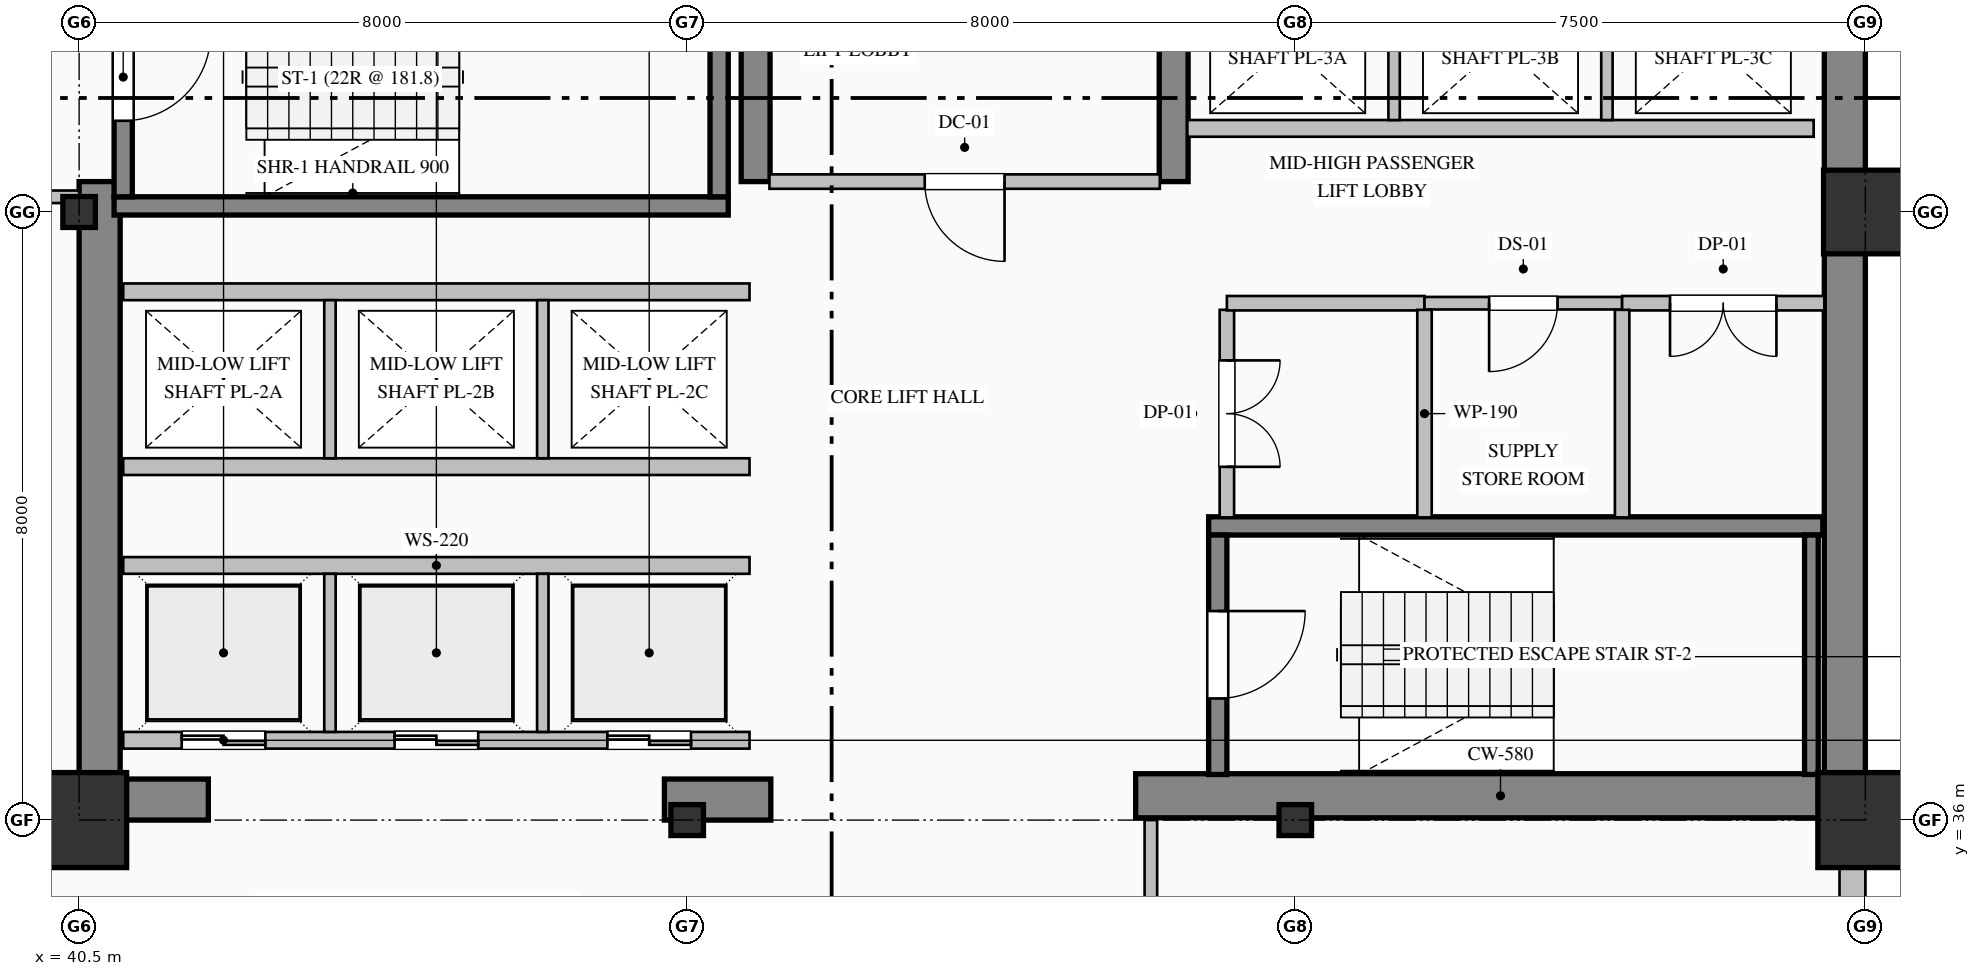
"""IFC4 building model, lengths in metres.
Left out: names, types, materials, properties, quantities, classifications, styles, units other than length and angle.
Written with IfcOpenShell. Run it as: python <this file> out.ifc"""

import sys

from ifc_helpers import new_model, si_unit, direction, frame, frame_2d, origin, origin_2d, place, context, subcontext, project, spatial, rectangle, hollow_rectangle, i_section, extrude, element, fill, save


model = new_model("IFC4")
c1 = context("Model", 3, precision=1e-05, world=origin(), true_north=direction((0.0, 1.0)))
c2 = subcontext(c1, "Body", "Model", "MODEL_VIEW")
j1 = project(units=[si_unit("LENGTHUNIT", "METRE"), si_unit("PLANEANGLEUNIT", "RADIAN")], contexts=[c1])
p1 = place(None, origin())
s1 = spatial("IfcSite", under=j1, at=p1, CompositionType="ELEMENT")
p2 = place(p1, origin())
s2 = spatial("IfcBuilding", under=s1, at=p2, CompositionType="ELEMENT")
p3 = place(p2, frame((0.0, 0.0, 60.2)))
s3 = spatial("IfcBuildingStorey", under=s2, at=p3, CompositionType="ELEMENT", Elevation=60.2)
p4 = place(p3, frame((63.73, 36.32, 0.0), z_axis=(0.0, 0.0, 1.0), x_axis=(0.0, 1.0, 0.0)))
e1 = element("IfcWall", 1, at=p4, inside=s3, PredefinedType="SHEAR", context=c2, shape_type="SweptSolid", body=[
    extrude(rectangle(XDim=15.14, YDim=0.54, at=frame_2d((7.57, 0.0))), origin(), (0.0, 0.0, 1.0), 3.75),
])
p5 = place(p3, frame((40.77, 36.54, 0.0), z_axis=(0.0, 0.0, 1.0), x_axis=(0.0, 1.0, 0.0)))
e2 = element("IfcWall", 2, at=p5, inside=s3, PredefinedType="SHEAR", context=c2, shape_type="SweptSolid", body=[
    extrude(rectangle(XDim=7.86, YDim=0.54, at=frame_2d((3.93, 0.0))), origin(), (0.0, 0.0, 1.0), 3.75),
])
p6 = place(p3, frame((40.5, 36.27, 0.0), z_axis=(0.0, 0.0, 1.0), x_axis=(1.0, 0.0, 0.0)))
e3 = element("IfcWall", 3, at=p6, inside=s3, PredefinedType="SHEAR", context=c2, shape_type="SweptSolid", body=[
    extrude(rectangle(XDim=1.7, YDim=0.54, at=frame_2d((0.85, 0.0))), origin(), (0.0, 0.0, 1.0), 3.75),
])
p7 = place(p3, frame((48.2, 36.27, 0.0), z_axis=(0.0, 0.0, 1.0), x_axis=(1.0, 0.0, 0.0)))
e4 = element("IfcWall", 4, at=p7, inside=s3, PredefinedType="SHEAR", context=c2, shape_type="SweptSolid", body=[
    extrude(rectangle(XDim=1.4, YDim=0.54, at=frame_2d((0.7, 0.0))), origin(), (0.0, 0.0, 1.0), 3.75),
])
p8 = place(p3, frame((54.4, 36.32, 0.0), z_axis=(0.0, 0.0, 1.0), x_axis=(1.0, 0.0, 0.0)))
e5 = element("IfcWall", 5, at=p8, inside=s3, PredefinedType="SHEAR", context=c2, shape_type="SweptSolid", body=[
    extrude(rectangle(XDim=9.6, YDim=0.58, at=frame_2d((4.8, 0.0))), origin(), (0.0, 0.0, 1.0), 4.0),
])
p9 = place(p3, frame((49.4, 44.4, 0.0), z_axis=(0.0, 0.0, 1.0), x_axis=(0.0, 1.0, 0.0)))
e6 = element("IfcWall", 6, at=p9, inside=s3, PredefinedType="SHEAR", context=c2, shape_type="SweptSolid", body=[
    extrude(rectangle(XDim=3.0, YDim=0.38, at=frame_2d((1.5, 0.0))), origin(), (0.0, 0.0, 1.0), 3.75),
])
p10 = place(p3, frame((54.9, 44.4, 0.0), z_axis=(0.0, 0.0, 1.0), x_axis=(0.0, 1.0, 0.0)))
e7 = element("IfcWall", 7, at=p10, inside=s3, PredefinedType="SHEAR", context=c2, shape_type="SweptSolid", body=[
    extrude(rectangle(XDim=7.06, YDim=0.38, at=frame_2d((3.53, 0.0))), origin(), (0.0, 0.0, 1.0), 3.75),
])
p11 = place(p3, frame((40.5, 36.0, 0.0), z_axis=(0.0, 0.0, 1.0), x_axis=(1.0, 0.0, 0.0)))
e8 = element("IfcColumn", 8, at=p11, inside=s3, PredefinedType="COLUMN", context=c2, shape_type="SweptSolid", body=[
    extrude(hollow_rectangle(XDim=1.25, YDim=1.25, WallThickness=0.045, at=origin_2d()), origin(), (0.0, 0.0, 1.0), 4.0),
])
for number, where, z_axis, x_axis in (
    (9, (40.5, 44.0, 0.0), (0.0, 0.0, 1.0), (1.0, 0.0, 0.0)),
    (10, (48.5, 36.0, 0.0), (0.0, 0.0, 1.0), (1.0, 0.0, 0.0)),
    (11, (56.5, 36.0, 0.0), (0.0, 0.0, 1.0), (1.0, 0.0, 0.0)),
):
    element("IfcColumn", number, at=place(p3, frame(where, z_axis=z_axis, x_axis=x_axis)), inside=s3, PredefinedType="COLUMN", context=c2, shape_type="SweptSolid", body=[
        extrude(i_section(OverallWidth=0.407, OverallDepth=0.428, WebThickness=0.02, FlangeThickness=0.035, FilletRadius=0.022, at=origin_2d()), origin(), (0.0, 0.0, 1.0), 4.0),
    ])
p12 = place(p3, frame((64.0, 36.0, 0.0), z_axis=(0.0, 0.0, 1.0), x_axis=(1.0, 0.0, 0.0)))
e12 = element("IfcColumn", 12, at=p12, inside=s3, PredefinedType="COLUMN", context=c2, shape_type="SweptSolid", body=[
    extrude(hollow_rectangle(XDim=1.25, YDim=1.25, WallThickness=0.045, at=origin_2d()), origin(), (0.0, 0.0, 1.0), 4.0),
])
p13 = place(p3, frame((64.0, 44.0, 0.0), z_axis=(0.0, 0.0, 1.0), x_axis=(1.0, 0.0, 0.0)))
e13 = element("IfcColumn", 13, at=p13, inside=s3, PredefinedType="COLUMN", context=c2, shape_type="SweptSolid", body=[
    extrude(hollow_rectangle(XDim=1.1, YDim=1.1, WallThickness=0.04, at=origin_2d()), origin(), (0.0, 0.0, 1.0), 4.0),
])
p14 = place(p3, frame((63.83, 36.05, 0.0), z_axis=(0.0, 0.0, 1.0), x_axis=(0.0, -1.0, 0.0)))
e14 = element("IfcWall", 14, at=p14, inside=s3, PredefinedType="SOLIDWALL", context=c2, shape_type="SweptSolid", body=[
    extrude(rectangle(XDim=28.05, YDim=0.34, at=frame_2d((14.025, 0.0))), origin(), (0.0, 0.0, 1.0), 3.25),
])
p15 = place(p14, frame((2.4, 0.0, 0.8)))
e15 = element("IfcOpeningElement", 15, at=p15, cuts=e14, PredefinedType="OPENING", context=c2, shape_type="SweptSolid", body=[
    extrude(rectangle(XDim=2.4, YDim=2.15, at=frame_2d((1.2, 1.075))), frame((0.0, 0.18, 0.0), z_axis=(0.0, -1.0, 0.0), x_axis=(1.0, 0.0, 0.0)), (0.0, 0.0, 1.0), 0.36),
])
p16 = place(p14, frame((9.75, 0.0, 0.85)))
e16 = element("IfcOpeningElement", 16, at=p16, cuts=e14, PredefinedType="OPENING", context=c2, shape_type="SweptSolid", body=[
    extrude(rectangle(XDim=2.1, YDim=2.05, at=frame_2d((1.05, 1.025))), frame((0.0, 0.18, 0.0), z_axis=(0.0, -1.0, 0.0), x_axis=(1.0, 0.0, 0.0)), (0.0, 0.0, 1.0), 0.36),
])
p17 = place(p3, frame((49.04, 44.08, 0.0), z_axis=(0.0, 0.0, 1.0), x_axis=(-1.0, 0.0, 0.0)))
e17 = element("IfcWall", 17, at=p17, inside=s3, PredefinedType="SOLIDWALL", context=c2, shape_type="SweptSolid", body=[
    extrude(rectangle(XDim=8.08, YDim=0.24, at=frame_2d((4.04, 0.0))), origin(), (0.0, 0.0, 1.0), 4.0),
])
p18 = place(p3, frame((41.08, 47.35, 0.0), z_axis=(0.0, 0.0, 1.0), x_axis=(0.0, -1.0, 0.0)))
e18 = element("IfcWall", 18, at=p18, inside=s3, PredefinedType="SOLIDWALL", context=c2, shape_type="SweptSolid", body=[
    extrude(rectangle(XDim=3.15, YDim=0.24, at=frame_2d((1.575, 0.0))), origin(), (0.0, 0.0, 1.0), 4.0),
])
p19 = place(p18, frame((1.0, 0.0, 0.0)))
e19 = element("IfcOpeningElement", 19, at=p19, cuts=e18, PredefinedType="OPENING", context=c2, shape_type="SweptSolid", body=[
    extrude(rectangle(XDim=1.15, YDim=2.2, at=frame_2d((0.575, 1.1))), frame((0.0, 0.13, 0.0), z_axis=(0.0, -1.0, 0.0), x_axis=(1.0, 0.0, 0.0)), (0.0, 0.0, 1.0), 0.26),
])
p20 = place(p3, frame((48.92, 44.2, 0.0), z_axis=(0.0, 0.0, 1.0), x_axis=(0.0, 1.0, 0.0)))
e20 = element("IfcWall", 20, at=p20, inside=s3, PredefinedType="SOLIDWALL", context=c2, shape_type="SweptSolid", body=[
    extrude(rectangle(XDim=3.15, YDim=0.24, at=frame_2d((1.575, 0.0))), origin(), (0.0, 0.0, 1.0), 4.0),
])
p21 = place(p3, frame((55.36, 39.87, 0.0), z_axis=(0.0, 0.0, 1.0), x_axis=(1.0, 0.0, 0.0)))
e21 = element("IfcWall", 21, at=p21, inside=s3, PredefinedType="SOLIDWALL", context=c2, shape_type="SweptSolid", body=[
    extrude(rectangle(XDim=8.08, YDim=0.24, at=frame_2d((4.04, 0.0))), origin(), (0.0, 0.0, 1.0), 4.0),
])
p22 = place(p3, frame((55.48, 39.75, 0.0), z_axis=(0.0, 0.0, 1.0), x_axis=(0.0, -1.0, 0.0)))
e22 = element("IfcWall", 22, at=p22, inside=s3, PredefinedType="SOLIDWALL", context=c2, shape_type="SweptSolid", body=[
    extrude(rectangle(XDim=3.15, YDim=0.24, at=frame_2d((1.575, 0.0))), origin(), (0.0, 0.0, 1.0), 4.0),
])
p23 = place(p22, frame((1.0, 0.0, 0.0)))
e23 = element("IfcOpeningElement", 23, at=p23, cuts=e22, PredefinedType="OPENING", context=c2, shape_type="SweptSolid", body=[
    extrude(rectangle(XDim=1.15, YDim=2.2, at=frame_2d((0.575, 1.1))), frame((0.0, 0.13, 0.0), z_axis=(0.0, -1.0, 0.0), x_axis=(1.0, 0.0, 0.0)), (0.0, 0.0, 1.0), 0.26),
])
p24 = place(p3, frame((63.29, 36.6, 0.0), z_axis=(0.0, 0.0, 1.0), x_axis=(0.0, 1.0, 0.0)))
e24 = element("IfcWall", 24, at=p24, inside=s3, PredefinedType="SOLIDWALL", context=c2, shape_type="SweptSolid", body=[
    extrude(rectangle(XDim=3.15, YDim=0.18, at=frame_2d((1.575, 0.0))), origin(), (0.0, 0.0, 1.0), 4.0),
])
p25 = place(p3, frame((49.32, 37.05, 0.0), z_axis=(0.0, 0.0, 1.0), x_axis=(-1.0, 0.0, 0.0)))
e25 = element("IfcWall", 25, at=p25, inside=s3, PredefinedType="PARTITIONING", context=c2, shape_type="SweptSolid", body=[
    extrude(rectangle(XDim=8.24, YDim=0.22, at=frame_2d((4.12, 0.0))), origin(), (0.0, 0.0, 1.0), 3.75),
])
p26 = place(p25, frame((6.37, 0.0, 0.0)))
e26 = element("IfcOpeningElement", 26, at=p26, cuts=e25, PredefinedType="OPENING", context=c2, shape_type="SweptSolid", body=[
    extrude(rectangle(XDim=1.1, YDim=2.2, at=frame_2d((0.55, 1.1))), frame((0.0, 0.12, 0.0), z_axis=(0.0, -1.0, 0.0), x_axis=(1.0, 0.0, 0.0)), (0.0, 0.0, 1.0), 0.24),
])
p27 = place(p25, frame((3.57, 0.0, 0.0)))
e27 = element("IfcOpeningElement", 27, at=p27, cuts=e25, PredefinedType="OPENING", context=c2, shape_type="SweptSolid", body=[
    extrude(rectangle(XDim=1.1, YDim=2.2, at=frame_2d((0.55, 1.1))), frame((0.0, 0.12, 0.0), z_axis=(0.0, -1.0, 0.0), x_axis=(1.0, 0.0, 0.0)), (0.0, 0.0, 1.0), 0.24),
])
p28 = place(p25, frame((0.77, 0.0, 0.0)))
e28 = element("IfcOpeningElement", 28, at=p28, cuts=e25, PredefinedType="OPENING", context=c2, shape_type="SweptSolid", body=[
    extrude(rectangle(XDim=1.1, YDim=2.2, at=frame_2d((0.55, 1.1))), frame((0.0, 0.12, 0.0), z_axis=(0.0, -1.0, 0.0), x_axis=(1.0, 0.0, 0.0)), (0.0, 0.0, 1.0), 0.24),
])
p29 = place(p3, frame((41.08, 39.35, 0.0), z_axis=(0.0, 0.0, 1.0), x_axis=(1.0, 0.0, 0.0)))
e29 = element("IfcWall", 29, at=p29, inside=s3, PredefinedType="PARTITIONING", context=c2, shape_type="SweptSolid", body=[
    extrude(rectangle(XDim=8.24, YDim=0.22, at=frame_2d((4.12, 0.0))), origin(), (0.0, 0.0, 1.0), 3.75),
])
for number, where, z_axis, x_axis in (
    (30, (43.8, 37.16, 0.0), (0.0, 0.0, 1.0), (0.0, 1.0, 0.0)),
    (31, (46.6, 37.16, 0.0), (0.0, 0.0, 1.0), (0.0, 1.0, 0.0)),
):
    element("IfcWall", number, at=place(p3, frame(where, z_axis=z_axis, x_axis=x_axis)), inside=s3, PredefinedType="PARTITIONING", context=c2, shape_type="SweptSolid", body=[
        extrude(rectangle(XDim=2.08, YDim=0.15, at=frame_2d((1.04, 0.0))), origin(), (0.0, 0.0, 1.0), 3.75),
    ])
for number, where, z_axis, x_axis in (
    (32, (49.32, 40.65, 0.0), (0.0, 0.0, 1.0), (-1.0, 0.0, 0.0)),
    (33, (41.08, 42.95, 0.0), (0.0, 0.0, 1.0), (1.0, 0.0, 0.0)),
):
    element("IfcWall", number, at=place(p3, frame(where, z_axis=z_axis, x_axis=x_axis)), inside=s3, PredefinedType="PARTITIONING", context=c2, shape_type="SweptSolid", body=[
        extrude(rectangle(XDim=8.24, YDim=0.22, at=frame_2d((4.12, 0.0))), origin(), (0.0, 0.0, 1.0), 3.75),
    ])
for number, where, z_axis, x_axis in (
    (34, (43.8, 40.76, 0.0), (0.0, 0.0, 1.0), (0.0, 1.0, 0.0)),
    (35, (46.6, 40.76, 0.0), (0.0, 0.0, 1.0), (0.0, 1.0, 0.0)),
):
    element("IfcWall", number, at=place(p3, frame(where, z_axis=z_axis, x_axis=x_axis)), inside=s3, PredefinedType="PARTITIONING", context=c2, shape_type="SweptSolid", body=[
        extrude(rectangle(XDim=2.08, YDim=0.15, at=frame_2d((1.04, 0.0))), origin(), (0.0, 0.0, 1.0), 3.75),
    ])
p30 = place(p3, frame((63.32, 45.1, 0.0), z_axis=(0.0, 0.0, 1.0), x_axis=(-1.0, 0.0, 0.0)))
e36 = element("IfcWall", 36, at=p30, inside=s3, PredefinedType="PARTITIONING", context=c2, shape_type="SweptSolid", body=[
    extrude(rectangle(XDim=8.24, YDim=0.22, at=frame_2d((4.12, 0.0))), origin(), (0.0, 0.0, 1.0), 3.75),
])
for number, where, z_axis, x_axis in (
    (37, (57.8, 45.21, 0.0), (0.0, 0.0, 1.0), (0.0, 1.0, 0.0)),
    (38, (60.6, 45.21, 0.0), (0.0, 0.0, 1.0), (0.0, 1.0, 0.0)),
):
    element("IfcWall", number, at=place(p3, frame(where, z_axis=z_axis, x_axis=x_axis)), inside=s3, PredefinedType="PARTITIONING", context=c2, shape_type="SweptSolid", body=[
        extrude(rectangle(XDim=2.03, YDim=0.15, at=frame_2d((1.015, 0.0))), origin(), (0.0, 0.0, 1.0), 3.75),
    ])
p31 = place(p3, frame((40.5, 44.2, 0.0), z_axis=(0.0, 0.0, 1.0), x_axis=(-1.0, 0.0, 0.0)))
e39 = element("IfcWall", 39, at=p31, inside=s3, PredefinedType="PARTITIONING", context=c2, shape_type="SweptSolid", body=[
    extrude(rectangle(XDim=2.7, YDim=0.165, at=frame_2d((1.35, 0.0))), origin(), (0.0, 0.0, 1.0), 3.75),
])
p32 = place(p31, frame((0.825, 0.0, 0.0)))
e40 = element("IfcOpeningElement", 40, at=p32, cuts=e39, PredefinedType="OPENING", context=c2, shape_type="SweptSolid", body=[
    extrude(rectangle(XDim=1.05, YDim=2.15, at=frame_2d((0.525, 1.075))), frame((0.0, 0.093, 0.0), z_axis=(0.0, -1.0, 0.0), x_axis=(1.0, 0.0, 0.0)), (0.0, 0.0, 1.0), 0.185),
])
p33 = place(p3, frame((54.718, 44.4, 0.0), z_axis=(0.0, 0.0, 1.0), x_axis=(-1.0, 0.0, 0.0)))
e41 = element("IfcWall", 41, at=p33, inside=s3, PredefinedType="PARTITIONING", context=c2, shape_type="SweptSolid", body=[
    extrude(rectangle(XDim=5.136, YDim=0.19, at=frame_2d((2.568, 0.0))), origin(), (0.0, 0.0, 1.0), 3.75),
])
p34 = place(p33, frame((2.043, 0.0, 0.0)))
e42 = element("IfcOpeningElement", 42, at=p34, cuts=e41, PredefinedType="OPENING", context=c2, shape_type="SweptSolid", body=[
    extrude(rectangle(XDim=1.05, YDim=2.15, at=frame_2d((0.525, 1.075))), frame((0.0, 0.105, 0.0), z_axis=(0.0, -1.0, 0.0), x_axis=(1.0, 0.0, 0.0)), (0.0, 0.0, 1.0), 0.21),
])
p35 = place(p3, frame((55.6, 42.713, 0.0), z_axis=(0.0, 0.0, 1.0), x_axis=(0.0, -1.0, 0.0)))
e43 = element("IfcWall", 43, at=p35, inside=s3, PredefinedType="PARTITIONING", context=c2, shape_type="SweptSolid", body=[
    extrude(rectangle(XDim=2.731, YDim=0.19, at=frame_2d((1.365, 0.0))), origin(), (0.0, 0.0, 1.0), 3.75),
])
p36 = place(p35, frame((0.666, 0.0, 0.0)))
e44 = element("IfcOpeningElement", 44, at=p36, cuts=e43, PredefinedType="OPENING", context=c2, shape_type="SweptSolid", body=[
    extrude(rectangle(XDim=1.4, YDim=2.25, at=frame_2d((0.7, 1.125))), frame((0.0, 0.105, 0.0), z_axis=(0.0, -1.0, 0.0), x_axis=(1.0, 0.0, 0.0)), (0.0, 0.0, 1.0), 0.21),
])
p37 = place(p3, frame((58.2, 42.8, 0.0), z_axis=(0.0, 0.0, 1.0), x_axis=(-1.0, 0.0, 0.0)))
e45 = element("IfcWall", 45, at=p37, inside=s3, PredefinedType="PARTITIONING", context=c2, shape_type="SweptSolid", body=[
    extrude(rectangle(XDim=2.6, YDim=0.19, at=frame_2d((1.3, 0.0))), origin(), (0.0, 0.0, 1.0), 3.75),
])
p38 = place(p3, frame((60.8, 42.8, 0.0), z_axis=(0.0, 0.0, 1.0), x_axis=(-1.0, 0.0, 0.0)))
e46 = element("IfcWall", 46, at=p38, inside=s3, PredefinedType="PARTITIONING", context=c2, shape_type="SweptSolid", body=[
    extrude(rectangle(XDim=2.6, YDim=0.165, at=frame_2d((1.3, 0.0))), origin(), (0.0, 0.0, 1.0), 3.75),
])
p39 = place(p38, frame((0.85, 0.0, 0.0)))
e47 = element("IfcOpeningElement", 47, at=p39, cuts=e46, PredefinedType="OPENING", context=c2, shape_type="SweptSolid", body=[
    extrude(rectangle(XDim=0.9, YDim=2.15, at=frame_2d((0.45, 1.075))), frame((0.0, 0.093, 0.0), z_axis=(0.0, -1.0, 0.0), x_axis=(1.0, 0.0, 0.0)), (0.0, 0.0, 1.0), 0.185),
])
p40 = place(p3, frame((63.46, 42.8, 0.0), z_axis=(0.0, 0.0, 1.0), x_axis=(-1.0, 0.0, 0.0)))
e48 = element("IfcWall", 48, at=p40, inside=s3, PredefinedType="PARTITIONING", context=c2, shape_type="SweptSolid", body=[
    extrude(rectangle(XDim=2.66, YDim=0.19, at=frame_2d((1.33, 0.0))), origin(), (0.0, 0.0, 1.0), 3.75),
])
p41 = place(p40, frame((0.63, 0.0, 0.0)))
e49 = element("IfcOpeningElement", 49, at=p41, cuts=e48, PredefinedType="OPENING", context=c2, shape_type="SweptSolid", body=[
    extrude(rectangle(XDim=1.4, YDim=2.25, at=frame_2d((0.7, 1.125))), frame((0.0, 0.105, 0.0), z_axis=(0.0, -1.0, 0.0), x_axis=(1.0, 0.0, 0.0)), (0.0, 0.0, 1.0), 0.21),
])
for number, where, z_axis, x_axis in (
    (50, (58.2, 42.713, 0.0), (0.0, 0.0, 1.0), (0.0, -1.0, 0.0)),
    (51, (60.8, 42.713, 0.0), (0.0, 0.0, 1.0), (0.0, -1.0, 0.0)),
):
    element("IfcWall", number, at=place(p3, frame(where, z_axis=z_axis, x_axis=x_axis)), inside=s3, PredefinedType="PARTITIONING", context=c2, shape_type="SweptSolid", body=[
        extrude(rectangle(XDim=2.731, YDim=0.19, at=frame_2d((1.365, 0.0))), origin(), (0.0, 0.0, 1.0), 3.75),
    ])
p42 = place(p3, frame((54.6, 36.0, 0.0), z_axis=(0.0, 0.0, 1.0), x_axis=(0.0, -1.0, 0.0)))
e52 = element("IfcWall", 52, at=p42, inside=s3, PredefinedType="PARTITIONING", context=c2, shape_type="SweptSolid", body=[
    extrude(rectangle(XDim=2.125, YDim=0.165, at=frame_2d((1.063, 0.0))), origin(), (0.0, 0.0, 1.0), 3.75),
])
p43 = place(p19, origin())
e53 = element("IfcDoor", 53, at=p43, inside=s3, OperationType="SINGLE_SWING_LEFT", PredefinedType="DOOR", context=c2, shape_type="SweptSolid", body=[
    extrude(rectangle(XDim=1.15, YDim=2.2, at=frame_2d((0.575, 1.1))), frame((0.0, 0.025, 0.0), z_axis=(0.0, -1.0, 0.0), x_axis=(1.0, 0.0, 0.0)), (0.0, 0.0, 1.0), 0.05),
])
fill(e19, e53)
p44 = place(p23, origin())
e54 = element("IfcDoor", 54, at=p44, inside=s3, OperationType="SINGLE_SWING_LEFT", PredefinedType="DOOR", context=c2, shape_type="SweptSolid", body=[
    extrude(rectangle(XDim=1.15, YDim=2.2, at=frame_2d((0.575, 1.1))), frame((0.0, 0.025, 0.0), z_axis=(0.0, -1.0, 0.0), x_axis=(1.0, 0.0, 0.0)), (0.0, 0.0, 1.0), 0.05),
])
fill(e23, e54)
p45 = place(p26, origin())
e55 = element("IfcDoor", 55, at=p45, inside=s3, OperationType="DOUBLE_DOOR_SLIDING", PredefinedType="DOOR", context=c2, shape_type="SweptSolid", body=[
    extrude(rectangle(XDim=1.1, YDim=2.2, at=frame_2d((0.55, 1.1))), frame((0.0, 0.025, 0.0), z_axis=(0.0, -1.0, 0.0), x_axis=(1.0, 0.0, 0.0)), (0.0, 0.0, 1.0), 0.05),
])
fill(e26, e55)
p46 = place(p27, origin())
e56 = element("IfcDoor", 56, at=p46, inside=s3, OperationType="DOUBLE_DOOR_SLIDING", PredefinedType="DOOR", context=c2, shape_type="SweptSolid", body=[
    extrude(rectangle(XDim=1.1, YDim=2.2, at=frame_2d((0.55, 1.1))), frame((0.0, 0.025, 0.0), z_axis=(0.0, -1.0, 0.0), x_axis=(1.0, 0.0, 0.0)), (0.0, 0.0, 1.0), 0.05),
])
fill(e27, e56)
p47 = place(p28, origin())
e57 = element("IfcDoor", 57, at=p47, inside=s3, OperationType="DOUBLE_DOOR_SLIDING", PredefinedType="DOOR", context=c2, shape_type="SweptSolid", body=[
    extrude(rectangle(XDim=1.1, YDim=2.2, at=frame_2d((0.55, 1.1))), frame((0.0, 0.025, 0.0), z_axis=(0.0, -1.0, 0.0), x_axis=(1.0, 0.0, 0.0)), (0.0, 0.0, 1.0), 0.05),
])
fill(e28, e57)
p48 = place(p34, origin())
e58 = element("IfcDoor", 58, at=p48, inside=s3, OperationType="SINGLE_SWING_LEFT", PredefinedType="DOOR", context=c2, shape_type="SweptSolid", body=[
    extrude(rectangle(XDim=1.05, YDim=2.15, at=frame_2d((0.525, 1.075))), frame((0.0, 0.025, 0.0), z_axis=(0.0, -1.0, 0.0), x_axis=(1.0, 0.0, 0.0)), (0.0, 0.0, 1.0), 0.05),
])
fill(e42, e58)
p49 = place(p36, origin())
e59 = element("IfcDoor", 59, at=p49, inside=s3, OperationType="DOUBLE_DOOR_SINGLE_SWING", PredefinedType="DOOR", context=c2, shape_type="SweptSolid", body=[
    extrude(rectangle(XDim=1.4, YDim=2.25, at=frame_2d((0.7, 1.125))), frame((0.0, 0.025, 0.0), z_axis=(0.0, -1.0, 0.0), x_axis=(1.0, 0.0, 0.0)), (0.0, 0.0, 1.0), 0.05),
])
fill(e44, e59)
p50 = place(p39, origin())
e60 = element("IfcDoor", 60, at=p50, inside=s3, OperationType="SINGLE_SWING_RIGHT", PredefinedType="DOOR", context=c2, shape_type="SweptSolid", body=[
    extrude(rectangle(XDim=0.9, YDim=2.15, at=frame_2d((0.45, 1.075))), frame((0.0, 0.025, 0.0), z_axis=(0.0, -1.0, 0.0), x_axis=(1.0, 0.0, 0.0)), (0.0, 0.0, 1.0), 0.05),
])
fill(e47, e60)
p51 = place(p41, origin())
e61 = element("IfcDoor", 61, at=p51, inside=s3, OperationType="DOUBLE_DOOR_SINGLE_SWING", PredefinedType="DOOR", context=c2, shape_type="SweptSolid", body=[
    extrude(rectangle(XDim=1.4, YDim=2.25, at=frame_2d((0.7, 1.125))), frame((0.0, 0.025, 0.0), z_axis=(0.0, -1.0, 0.0), x_axis=(1.0, 0.0, 0.0)), (0.0, 0.0, 1.0), 0.05),
])
fill(e49, e61)
save(model, sys.argv[1])
